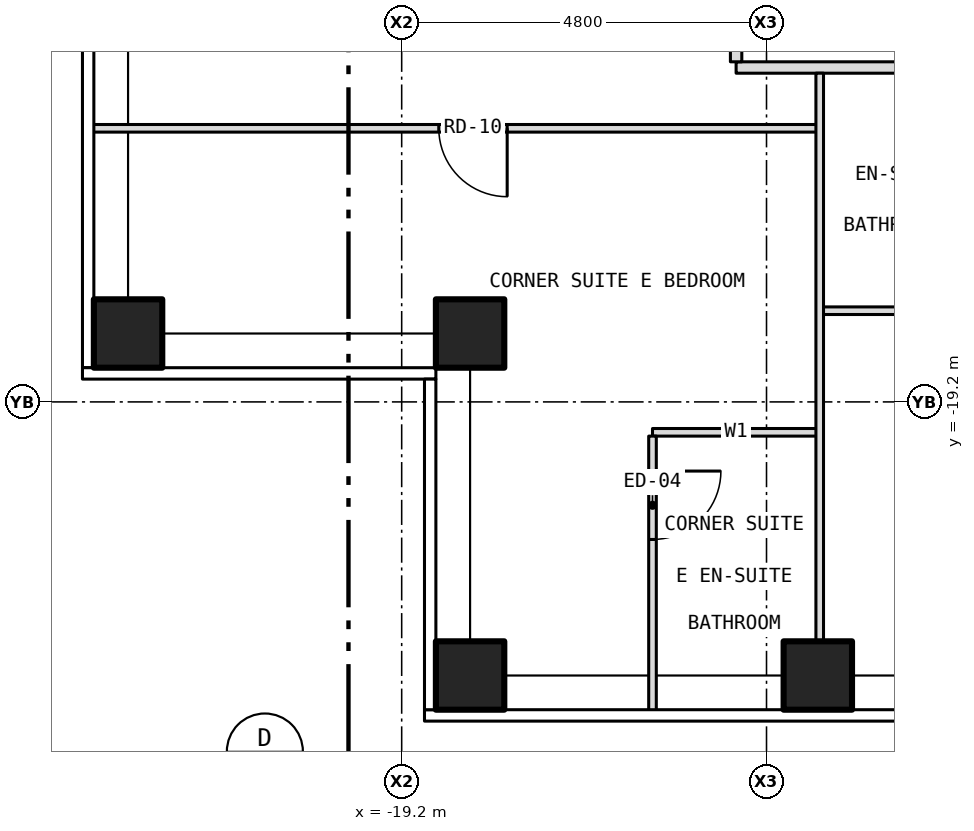
"""IFC4 building model, lengths in metres.
Left out: names, types, materials, properties, quantities, classifications, styles, units other than length and angle.
Written with IfcOpenShell. Run it as: python <this file> out.ifc"""

import sys

from ifc_helpers import new_model, si_unit, direction, frame, frame_2d, origin, origin_2d, place, context, subcontext, project, spatial, rectangle, hollow_rectangle, extrude, element, fill, save


model = new_model("IFC4")
c1 = context("Model", 3, precision=1e-05, world=origin(), true_north=direction((0.0, 1.0)))
c2 = subcontext(c1, "Body", "Model", "MODEL_VIEW")
j1 = project(units=[si_unit("LENGTHUNIT", "METRE"), si_unit("PLANEANGLEUNIT", "RADIAN")], contexts=[c1])
p1 = place(None, origin())
s1 = spatial("IfcSite", under=j1, at=p1, CompositionType="ELEMENT")
p2 = place(p1, origin())
s2 = spatial("IfcBuilding", under=s1, at=p2, CompositionType="ELEMENT")
p3 = place(p2, frame((0.0, 0.0, 134.5)))
s3 = spatial("IfcBuildingStorey", under=s2, at=p3, CompositionType="ELEMENT", Elevation=134.5)
for number, where, z_axis, x_axis in (
    (1, (-18.3, -22.8, -0.15), (0.0, 0.0, 1.0), (1.0, 0.0, 0.0)),
    (2, (-13.725, -22.8, -0.15), (0.0, 0.0, 1.0), (1.0, 0.0, 0.0)),
    (3, (-22.8, -18.3, -0.15), (0.0, 0.0, 1.0), (1.0, 0.0, 0.0)),
    (4, (-18.3, -18.3, -0.15), (0.0, 0.0, 1.0), (1.0, 0.0, 0.0)),
):
    element("IfcColumn", number, at=place(p3, frame(where, z_axis=z_axis, x_axis=x_axis)), inside=s3, PredefinedType="COLUMN", context=c2, shape_type="SweptSolid", body=[
        extrude(hollow_rectangle(XDim=0.9, YDim=0.9, WallThickness=0.05, at=origin_2d()), origin(), (0.0, 0.0, 1.0), 3.35),
    ])
for number, where, z_axis, x_axis in (
    (5, (-15.9, -19.6, 0.0), (0.0, 0.0, 1.0), (1.0, 0.0, 0.0)),
    (6, (-13.7, -18.0, 0.0), (0.0, 0.0, 1.0), (1.0, 0.0, 0.0)),
):
    element("IfcWall", number, at=place(p3, frame(where, z_axis=z_axis, x_axis=x_axis)), inside=s3, PredefinedType="PARTITIONING", context=c2, shape_type="SweptSolid", body=[
        extrude(rectangle(XDim=2.2, YDim=0.1, at=frame_2d((1.1, 0.0))), origin(), (0.0, 0.0, 1.0), 3.2),
    ])
p4 = place(p3, frame((-23.28, -15.6, 0.0), z_axis=(0.0, 0.0, 1.0), x_axis=(1.0, 0.0, 0.0)))
e7 = element("IfcWall", 7, at=p4, inside=s3, PredefinedType="PARTITIONING", context=c2, shape_type="SweptSolid", body=[
    extrude(rectangle(XDim=9.58, YDim=0.1, at=frame_2d((4.79, 0.0))), origin(), (0.0, 0.0, 1.0), 3.2),
])
p5 = place(p4, frame((4.568, 0.0, 0.0)))
e8 = element("IfcOpeningElement", 8, at=p5, cuts=e7, PredefinedType="OPENING", context=c2, shape_type="SweptSolid", body=[
    extrude(rectangle(XDim=0.9, YDim=2.1, at=frame_2d((0.45, 1.05))), frame((0.0, 0.062, 0.0), z_axis=(0.0, -1.0, 0.0), x_axis=(1.0, 0.0, 0.0)), (0.0, 0.0, 1.0), 0.124),
])
p6 = place(p3, frame((-14.8, -14.8, 0.0), z_axis=(0.0, 0.0, 1.0), x_axis=(1.0, 0.0, 0.0)))
e9 = element("IfcWall", 9, at=p6, inside=s3, PredefinedType="PARTITIONING", context=c2, shape_type="SweptSolid", body=[
    extrude(rectangle(XDim=6.88, YDim=0.15, at=frame_2d((3.44, 0.0))), origin(), (0.0, 0.0, 1.0), 3.2),
])
p7 = place(p6, frame((4.562, 0.0, 0.0)))
e10 = element("IfcOpeningElement", 10, at=p7, cuts=e9, PredefinedType="OPENING", context=c2, shape_type="SweptSolid", body=[
    extrude(rectangle(XDim=1.0, YDim=2.1, at=frame_2d((0.5, 1.05))), frame((0.0, 0.087, 0.0), z_axis=(0.0, -1.0, 0.0), x_axis=(1.0, 0.0, 0.0)), (0.0, 0.0, 1.0), 0.174),
])
p8 = place(p3, frame((-15.9, -23.28, 0.0), z_axis=(0.0, 0.0, 1.0), x_axis=(0.0, 1.0, 0.0)))
e11 = element("IfcWall", 11, at=p8, inside=s3, PredefinedType="PARTITIONING", context=c2, shape_type="SweptSolid", body=[
    extrude(rectangle(XDim=3.63, YDim=0.1, at=frame_2d((1.815, 0.0))), origin(), (0.0, 0.0, 1.0), 3.2),
])
p9 = place(p8, frame((2.27, 0.0, 0.0)))
e12 = element("IfcOpeningElement", 12, at=p9, cuts=e11, PredefinedType="OPENING", context=c2, shape_type="SweptSolid", body=[
    extrude(rectangle(XDim=0.9, YDim=2.1, at=frame_2d((0.45, 1.05))), frame((0.0, 0.062, 0.0), z_axis=(0.0, -1.0, 0.0), x_axis=(1.0, 0.0, 0.0)), (0.0, 0.0, 1.0), 0.124),
])
p10 = place(p3, frame((-14.8, -14.725, 0.0), z_axis=(0.0, 0.0, 1.0), x_axis=(0.0, 1.0, 0.0)))
e13 = element("IfcWall", 13, at=p10, inside=s3, PredefinedType="PARTITIONING", context=c2, shape_type="SweptSolid", body=[
    extrude(rectangle(XDim=3.85, YDim=0.15, at=frame_2d((1.925, 0.0))), origin(), (0.0, 0.0, 1.0), 3.2),
])
p11 = place(p10, frame((0.525, 0.0, 0.0)))
e14 = element("IfcOpeningElement", 14, at=p11, cuts=e13, PredefinedType="OPENING", context=c2, shape_type="SweptSolid", body=[
    extrude(rectangle(XDim=1.0, YDim=2.1, at=frame_2d((0.5, 1.05))), frame((0.0, 0.087, 0.0), z_axis=(0.0, -1.0, 0.0), x_axis=(1.0, 0.0, 0.0)), (0.0, 0.0, 1.0), 0.174),
])
p12 = place(p3, frame((-13.7, -22.68, 0.0), z_axis=(0.0, 0.0, 1.0), x_axis=(0.0, 1.0, 0.0)))
e15 = element("IfcWall", 15, at=p12, inside=s3, PredefinedType="PARTITIONING", context=c2, shape_type="SweptSolid", body=[
    extrude(rectangle(XDim=7.805, YDim=0.1, at=frame_2d((3.902, 0.0))), origin(), (0.0, 0.0, 1.0), 3.2),
])
p13 = place(p5, origin())
e16 = element("IfcDoor", 16, at=p13, inside=s3, OperationType="SINGLE_SWING_RIGHT", PredefinedType="DOOR", context=c2, shape_type="SweptSolid", body=[
    extrude(rectangle(XDim=0.9, YDim=2.1, at=frame_2d((0.45, 1.05))), frame((0.0, 0.025, 0.0), z_axis=(0.0, -1.0, 0.0), x_axis=(1.0, 0.0, 0.0)), (0.0, 0.0, 1.0), 0.05),
])
fill(e8, e16)
p14 = place(p9, origin())
e17 = element("IfcDoor", 17, at=p14, inside=s3, OperationType="SINGLE_SWING_RIGHT", PredefinedType="DOOR", context=c2, shape_type="SweptSolid", body=[
    extrude(rectangle(XDim=0.9, YDim=2.1, at=frame_2d((0.45, 1.05))), frame((0.0, 0.025, 0.0), z_axis=(0.0, -1.0, 0.0), x_axis=(1.0, 0.0, 0.0)), (0.0, 0.0, 1.0), 0.05),
])
fill(e12, e17)
save(model, sys.argv[1])
